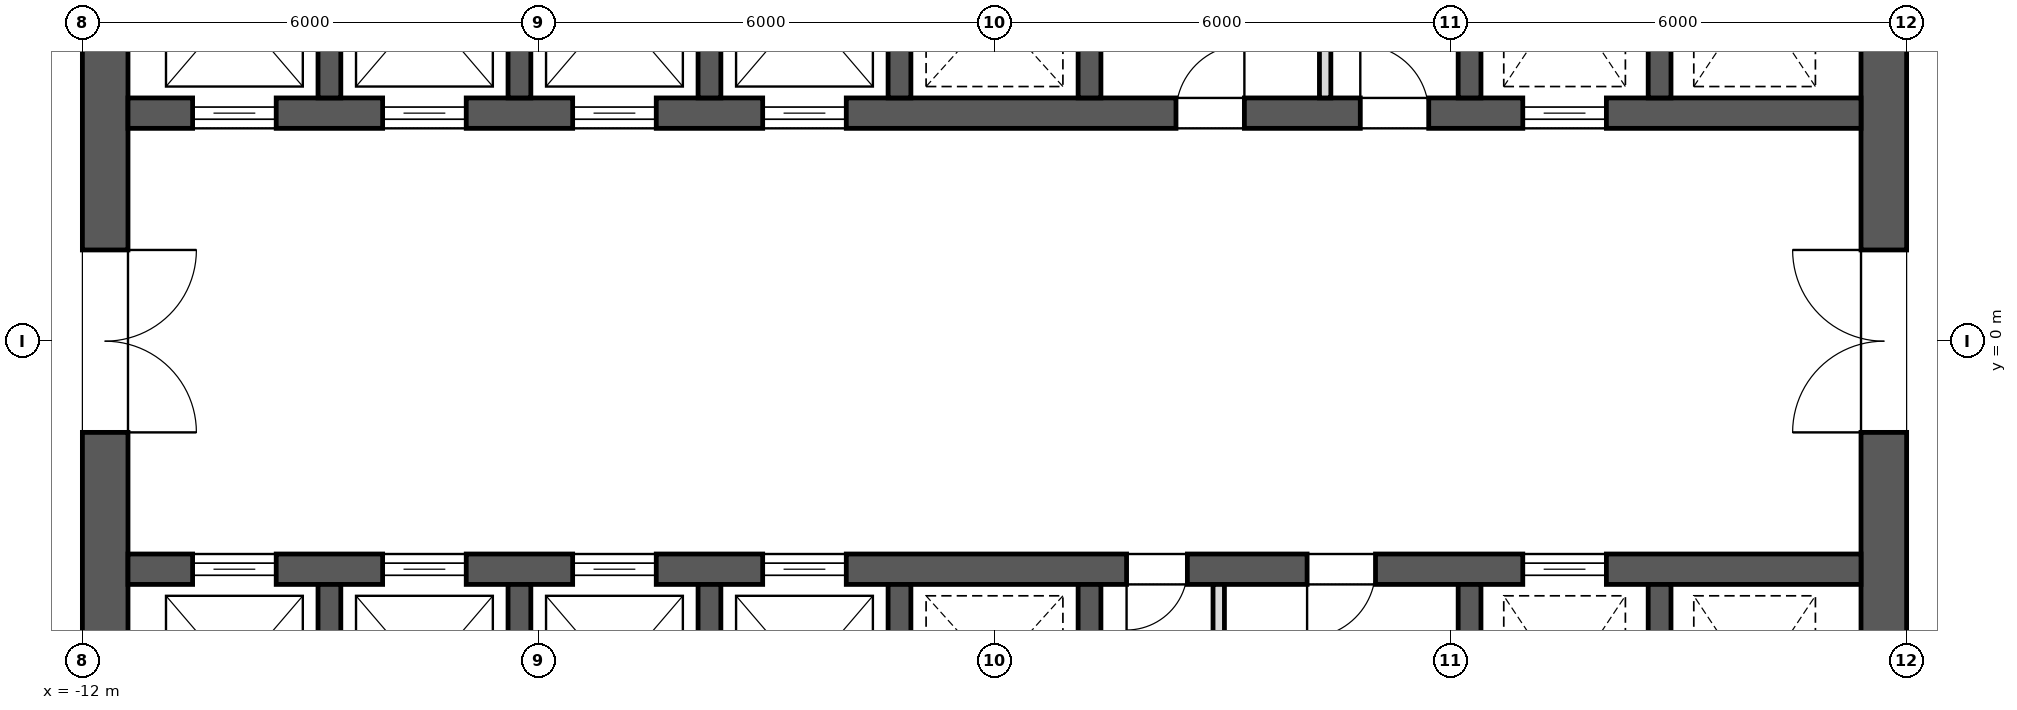
"""IFC4 building model, lengths in metres.
Left out: names, types, materials, properties, quantities, classifications, styles, units other than length and angle.
Written with IfcOpenShell. Run it as: python <this file> out.ifc"""

import sys

from ifc_helpers import new_model, si_unit, direction, frame, frame_2d, origin, place, context, subcontext, project, spatial, rectangle, extrude, element, fill, save


model = new_model("IFC4")
c1 = context("Model", 3, precision=1e-05, world=origin(), true_north=direction((0.0, 1.0)))
c2 = subcontext(c1, "Body", "Model", "MODEL_VIEW")
j1 = project(units=[si_unit("LENGTHUNIT", "METRE"), si_unit("PLANEANGLEUNIT", "RADIAN")], contexts=[c1])
p1 = place(None, origin())
s1 = spatial("IfcSite", under=j1, at=p1, CompositionType="ELEMENT")
p2 = place(p1, origin())
s2 = spatial("IfcBuilding", under=s1, at=p2, CompositionType="ELEMENT")
p3 = place(p2, frame((0.0, 0.0, 198.9)))
s3 = spatial("IfcBuildingStorey", under=s2, at=p3, CompositionType="ELEMENT", Elevation=198.9)
p4 = place(p3, frame((11.7, -11.4, 0.0), z_axis=(0.0, 0.0, 1.0), x_axis=(0.0, 1.0, 0.0)))
e1 = element("IfcWall", 1, at=p4, inside=s3, PredefinedType="SHEAR", context=c2, shape_type="SweptSolid", body=[
    extrude(rectangle(XDim=22.8, YDim=0.6, at=frame_2d((11.4, 0.0))), origin(), (0.0, 0.0, 1.0), 4.0),
])
p5 = place(p4, frame((10.2, 0.0, 0.0)))
e2 = element("IfcOpeningElement", 2, at=p5, cuts=e1, PredefinedType="OPENING", context=c2, shape_type="SweptSolid", body=[
    extrude(rectangle(XDim=2.4, YDim=2.1, at=frame_2d((1.2, 1.05))), frame((0.0, 0.312, 0.0), z_axis=(0.0, -1.0, 0.0), x_axis=(1.0, 0.0, 0.0)), (0.0, 0.0, 1.0), 0.624),
])
p6 = place(p4, frame((19.5, 0.0, 0.0)))
e3 = element("IfcOpeningElement", 3, at=p6, cuts=e1, PredefinedType="OPENING", context=c2, shape_type="SweptSolid", body=[
    extrude(rectangle(XDim=1.2, YDim=2.1, at=frame_2d((0.6, 1.05))), frame((0.0, 0.312, 0.0), z_axis=(0.0, -1.0, 0.0), x_axis=(1.0, 0.0, 0.0)), (0.0, 0.0, 1.0), 0.624),
])
p7 = place(p4, frame((2.1, 0.0, 0.0)))
e4 = element("IfcOpeningElement", 4, at=p7, cuts=e1, PredefinedType="OPENING", context=c2, shape_type="SweptSolid", body=[
    extrude(rectangle(XDim=1.2, YDim=2.1, at=frame_2d((0.6, 1.05))), frame((0.0, 0.312, 0.0), z_axis=(0.0, -1.0, 0.0), x_axis=(1.0, 0.0, 0.0)), (0.0, 0.0, 1.0), 0.624),
])
p8 = place(p3, frame((-11.7, -11.4, 0.0), z_axis=(0.0, 0.0, 1.0), x_axis=(0.0, 1.0, 0.0)))
e5 = element("IfcWall", 5, at=p8, inside=s3, PredefinedType="SHEAR", context=c2, shape_type="SweptSolid", body=[
    extrude(rectangle(XDim=22.8, YDim=0.6, at=frame_2d((11.4, 0.0))), origin(), (0.0, 0.0, 1.0), 4.0),
])
p9 = place(p8, frame((10.2, 0.0, 0.0)))
e6 = element("IfcOpeningElement", 6, at=p9, cuts=e5, PredefinedType="OPENING", context=c2, shape_type="SweptSolid", body=[
    extrude(rectangle(XDim=2.4, YDim=2.1, at=frame_2d((1.2, 1.05))), frame((0.0, 0.312, 0.0), z_axis=(0.0, -1.0, 0.0), x_axis=(1.0, 0.0, 0.0)), (0.0, 0.0, 1.0), 0.624),
])
p10 = place(p8, frame((18.925, 0.0, 0.0)))
e7 = element("IfcOpeningElement", 7, at=p10, cuts=e5, PredefinedType="OPENING", context=c2, shape_type="SweptSolid", body=[
    extrude(rectangle(XDim=1.2, YDim=2.1, at=frame_2d((0.6, 1.05))), frame((0.0, 0.312, 0.0), z_axis=(0.0, -1.0, 0.0), x_axis=(1.0, 0.0, 0.0)), (0.0, 0.0, 1.0), 0.624),
])
p11 = place(p8, frame((2.675, 0.0, 0.0)))
e8 = element("IfcOpeningElement", 8, at=p11, cuts=e5, PredefinedType="OPENING", context=c2, shape_type="SweptSolid", body=[
    extrude(rectangle(XDim=1.2, YDim=2.1, at=frame_2d((0.6, 1.05))), frame((0.0, 0.312, 0.0), z_axis=(0.0, -1.0, 0.0), x_axis=(1.0, 0.0, 0.0)), (0.0, 0.0, 1.0), 0.624),
])
p12 = place(p3, frame((-11.4, 3.0, 0.0), z_axis=(0.0, 0.0, 1.0), x_axis=(1.0, 0.0, 0.0)))
e9 = element("IfcWall", 9, at=p12, inside=s3, PredefinedType="SHEAR", context=c2, shape_type="SweptSolid", body=[
    extrude(rectangle(XDim=22.8, YDim=0.4, at=frame_2d((11.4, 0.0))), origin(), (0.0, 0.0, 1.0), 4.0),
])
p13 = place(p12, frame((0.85, 0.0, 0.0)))
e10 = element("IfcOpeningElement", 10, at=p13, cuts=e9, PredefinedType="OPENING", context=c2, shape_type="SweptSolid", body=[
    extrude(rectangle(XDim=1.1, YDim=2.1, at=frame_2d((0.55, 1.05))), frame((0.0, 0.212, 0.0), z_axis=(0.0, -1.0, 0.0), x_axis=(1.0, 0.0, 0.0)), (0.0, 0.0, 1.0), 0.424),
])
p14 = place(p12, frame((3.35, 0.0, 0.0)))
e11 = element("IfcOpeningElement", 11, at=p14, cuts=e9, PredefinedType="OPENING", context=c2, shape_type="SweptSolid", body=[
    extrude(rectangle(XDim=1.1, YDim=2.1, at=frame_2d((0.55, 1.05))), frame((0.0, 0.212, 0.0), z_axis=(0.0, -1.0, 0.0), x_axis=(1.0, 0.0, 0.0)), (0.0, 0.0, 1.0), 0.424),
])
p15 = place(p12, frame((5.85, 0.0, 0.0)))
e12 = element("IfcOpeningElement", 12, at=p15, cuts=e9, PredefinedType="OPENING", context=c2, shape_type="SweptSolid", body=[
    extrude(rectangle(XDim=1.1, YDim=2.1, at=frame_2d((0.55, 1.05))), frame((0.0, 0.212, 0.0), z_axis=(0.0, -1.0, 0.0), x_axis=(1.0, 0.0, 0.0)), (0.0, 0.0, 1.0), 0.424),
])
p16 = place(p12, frame((8.35, 0.0, 0.0)))
e13 = element("IfcOpeningElement", 13, at=p16, cuts=e9, PredefinedType="OPENING", context=c2, shape_type="SweptSolid", body=[
    extrude(rectangle(XDim=1.1, YDim=2.1, at=frame_2d((0.55, 1.05))), frame((0.0, 0.212, 0.0), z_axis=(0.0, -1.0, 0.0), x_axis=(1.0, 0.0, 0.0)), (0.0, 0.0, 1.0), 0.424),
])
p17 = place(p12, frame((18.35, 0.0, 0.0)))
e14 = element("IfcOpeningElement", 14, at=p17, cuts=e9, PredefinedType="OPENING", context=c2, shape_type="SweptSolid", body=[
    extrude(rectangle(XDim=1.1, YDim=2.1, at=frame_2d((0.55, 1.05))), frame((0.0, 0.212, 0.0), z_axis=(0.0, -1.0, 0.0), x_axis=(1.0, 0.0, 0.0)), (0.0, 0.0, 1.0), 0.424),
])
p18 = place(p12, frame((13.788, 0.0, 0.0)))
e15 = element("IfcOpeningElement", 15, at=p18, cuts=e9, PredefinedType="OPENING", context=c2, shape_type="SweptSolid", body=[
    extrude(rectangle(XDim=0.9, YDim=2.1, at=frame_2d((0.45, 1.05))), frame((0.0, 0.212, 0.0), z_axis=(0.0, -1.0, 0.0), x_axis=(1.0, 0.0, 0.0)), (0.0, 0.0, 1.0), 0.424),
])
p19 = place(p12, frame((16.212, 0.0, 0.0)))
e16 = element("IfcOpeningElement", 16, at=p19, cuts=e9, PredefinedType="OPENING", context=c2, shape_type="SweptSolid", body=[
    extrude(rectangle(XDim=0.9, YDim=2.1, at=frame_2d((0.45, 1.05))), frame((0.0, 0.212, 0.0), z_axis=(0.0, -1.0, 0.0), x_axis=(1.0, 0.0, 0.0)), (0.0, 0.0, 1.0), 0.424),
])
for number, where, z_axis, x_axis in (
    (17, (-8.75, 3.2, 0.0), (0.0, 0.0, 1.0), (0.0, 1.0, 0.0)),
    (18, (-6.25, 3.2, 0.0), (0.0, 0.0, 1.0), (0.0, 1.0, 0.0)),
    (19, (-3.75, 3.2, 0.0), (0.0, 0.0, 1.0), (0.0, 1.0, 0.0)),
    (20, (-1.25, 3.2, 0.0), (0.0, 0.0, 1.0), (0.0, 1.0, 0.0)),
    (21, (1.25, 3.2, 0.0), (0.0, 0.0, 1.0), (0.0, 1.0, 0.0)),
    (22, (6.25, 3.2, 0.0), (0.0, 0.0, 1.0), (0.0, 1.0, 0.0)),
    (23, (8.75, 3.2, 0.0), (0.0, 0.0, 1.0), (0.0, 1.0, 0.0)),
):
    element("IfcWall", number, at=place(p3, frame(where, z_axis=z_axis, x_axis=x_axis)), inside=s3, PredefinedType="SHEAR", context=c2, shape_type="SweptSolid", body=[
        extrude(rectangle(XDim=2.9, YDim=0.3, at=frame_2d((1.45, 0.0))), origin(), (0.0, 0.0, 1.0), 4.0),
    ])
p20 = place(p3, frame((-11.4, -3.0, 0.0), z_axis=(0.0, 0.0, 1.0), x_axis=(1.0, 0.0, 0.0)))
e24 = element("IfcWall", 24, at=p20, inside=s3, PredefinedType="SHEAR", context=c2, shape_type="SweptSolid", body=[
    extrude(rectangle(XDim=22.8, YDim=0.4, at=frame_2d((11.4, 0.0))), origin(), (0.0, 0.0, 1.0), 4.0),
])
p21 = place(p20, frame((0.85, 0.0, 0.0)))
e25 = element("IfcOpeningElement", 25, at=p21, cuts=e24, PredefinedType="OPENING", context=c2, shape_type="SweptSolid", body=[
    extrude(rectangle(XDim=1.1, YDim=2.1, at=frame_2d((0.55, 1.05))), frame((0.0, 0.212, 0.0), z_axis=(0.0, -1.0, 0.0), x_axis=(1.0, 0.0, 0.0)), (0.0, 0.0, 1.0), 0.424),
])
p22 = place(p20, frame((3.35, 0.0, 0.0)))
e26 = element("IfcOpeningElement", 26, at=p22, cuts=e24, PredefinedType="OPENING", context=c2, shape_type="SweptSolid", body=[
    extrude(rectangle(XDim=1.1, YDim=2.1, at=frame_2d((0.55, 1.05))), frame((0.0, 0.212, 0.0), z_axis=(0.0, -1.0, 0.0), x_axis=(1.0, 0.0, 0.0)), (0.0, 0.0, 1.0), 0.424),
])
p23 = place(p20, frame((5.85, 0.0, 0.0)))
e27 = element("IfcOpeningElement", 27, at=p23, cuts=e24, PredefinedType="OPENING", context=c2, shape_type="SweptSolid", body=[
    extrude(rectangle(XDim=1.1, YDim=2.1, at=frame_2d((0.55, 1.05))), frame((0.0, 0.212, 0.0), z_axis=(0.0, -1.0, 0.0), x_axis=(1.0, 0.0, 0.0)), (0.0, 0.0, 1.0), 0.424),
])
p24 = place(p20, frame((8.35, 0.0, 0.0)))
e28 = element("IfcOpeningElement", 28, at=p24, cuts=e24, PredefinedType="OPENING", context=c2, shape_type="SweptSolid", body=[
    extrude(rectangle(XDim=1.1, YDim=2.1, at=frame_2d((0.55, 1.05))), frame((0.0, 0.212, 0.0), z_axis=(0.0, -1.0, 0.0), x_axis=(1.0, 0.0, 0.0)), (0.0, 0.0, 1.0), 0.424),
])
p25 = place(p20, frame((18.35, 0.0, 0.0)))
e29 = element("IfcOpeningElement", 29, at=p25, cuts=e24, PredefinedType="OPENING", context=c2, shape_type="SweptSolid", body=[
    extrude(rectangle(XDim=1.1, YDim=2.1, at=frame_2d((0.55, 1.05))), frame((0.0, 0.212, 0.0), z_axis=(0.0, -1.0, 0.0), x_axis=(1.0, 0.0, 0.0)), (0.0, 0.0, 1.0), 0.424),
])
p26 = place(p20, frame((13.137, 0.0, 0.0)))
e30 = element("IfcOpeningElement", 30, at=p26, cuts=e24, PredefinedType="OPENING", context=c2, shape_type="SweptSolid", body=[
    extrude(rectangle(XDim=0.8, YDim=2.1, at=frame_2d((0.4, 1.05))), frame((0.0, 0.212, 0.0), z_axis=(0.0, -1.0, 0.0), x_axis=(1.0, 0.0, 0.0)), (0.0, 0.0, 1.0), 0.424),
])
p27 = place(p20, frame((15.512, 0.0, 0.0)))
e31 = element("IfcOpeningElement", 31, at=p27, cuts=e24, PredefinedType="OPENING", context=c2, shape_type="SweptSolid", body=[
    extrude(rectangle(XDim=0.9, YDim=2.1, at=frame_2d((0.45, 1.05))), frame((0.0, 0.212, 0.0), z_axis=(0.0, -1.0, 0.0), x_axis=(1.0, 0.0, 0.0)), (0.0, 0.0, 1.0), 0.424),
])
for number, where, z_axis, x_axis in (
    (32, (-8.75, -6.1, 0.0), (0.0, 0.0, 1.0), (0.0, 1.0, 0.0)),
    (33, (-6.25, -6.1, 0.0), (0.0, 0.0, 1.0), (0.0, 1.0, 0.0)),
    (34, (-3.75, -6.1, 0.0), (0.0, 0.0, 1.0), (0.0, 1.0, 0.0)),
    (35, (-1.25, -6.1, 0.0), (0.0, 0.0, 1.0), (0.0, 1.0, 0.0)),
    (36, (1.25, -6.1, 0.0), (0.0, 0.0, 1.0), (0.0, 1.0, 0.0)),
    (37, (6.25, -6.1, 0.0), (0.0, 0.0, 1.0), (0.0, 1.0, 0.0)),
    (38, (8.75, -6.1, 0.0), (0.0, 0.0, 1.0), (0.0, 1.0, 0.0)),
):
    element("IfcWall", number, at=place(p3, frame(where, z_axis=z_axis, x_axis=x_axis)), inside=s3, PredefinedType="SHEAR", context=c2, shape_type="SweptSolid", body=[
        extrude(rectangle(XDim=2.9, YDim=0.3, at=frame_2d((1.45, 0.0))), origin(), (0.0, 0.0, 1.0), 4.0),
    ])
for number, where, z_axis, x_axis in (
    (39, (4.35, 3.2, 0.0), (0.0, 0.0, 1.0), (0.0, 1.0, 0.0)),
    (40, (2.95, -6.1, 0.0), (0.0, 0.0, 1.0), (0.0, 1.0, 0.0)),
):
    element("IfcWall", number, at=place(p3, frame(where, z_axis=z_axis, x_axis=x_axis)), inside=s3, PredefinedType="PARTITIONING", context=c2, shape_type="SweptSolid", body=[
        extrude(rectangle(XDim=2.9, YDim=0.15, at=frame_2d((1.45, 0.0))), origin(), (0.0, 0.0, 1.0), 3.7),
    ])
p28 = place(p13, origin())
e41 = element("IfcDoor", 41, at=p28, inside=s3, OperationType="SLIDING_TO_LEFT", PredefinedType="DOOR", context=c2, shape_type="SweptSolid", body=[
    extrude(rectangle(XDim=1.1, YDim=2.1, at=frame_2d((0.55, 1.05))), frame((0.0, 0.025, 0.0), z_axis=(0.0, -1.0, 0.0), x_axis=(1.0, 0.0, 0.0)), (0.0, 0.0, 1.0), 0.05),
])
fill(e10, e41)
p29 = place(p14, origin())
e42 = element("IfcDoor", 42, at=p29, inside=s3, OperationType="SLIDING_TO_LEFT", PredefinedType="DOOR", context=c2, shape_type="SweptSolid", body=[
    extrude(rectangle(XDim=1.1, YDim=2.1, at=frame_2d((0.55, 1.05))), frame((0.0, 0.025, 0.0), z_axis=(0.0, -1.0, 0.0), x_axis=(1.0, 0.0, 0.0)), (0.0, 0.0, 1.0), 0.05),
])
fill(e11, e42)
p30 = place(p21, origin())
e43 = element("IfcDoor", 43, at=p30, inside=s3, OperationType="SLIDING_TO_LEFT", PredefinedType="DOOR", context=c2, shape_type="SweptSolid", body=[
    extrude(rectangle(XDim=1.1, YDim=2.1, at=frame_2d((0.55, 1.05))), frame((0.0, 0.025, 0.0), z_axis=(0.0, -1.0, 0.0), x_axis=(1.0, 0.0, 0.0)), (0.0, 0.0, 1.0), 0.05),
])
fill(e25, e43)
p31 = place(p22, origin())
e44 = element("IfcDoor", 44, at=p31, inside=s3, OperationType="SLIDING_TO_LEFT", PredefinedType="DOOR", context=c2, shape_type="SweptSolid", body=[
    extrude(rectangle(XDim=1.1, YDim=2.1, at=frame_2d((0.55, 1.05))), frame((0.0, 0.025, 0.0), z_axis=(0.0, -1.0, 0.0), x_axis=(1.0, 0.0, 0.0)), (0.0, 0.0, 1.0), 0.05),
])
fill(e26, e44)
p32 = place(p15, origin())
e45 = element("IfcDoor", 45, at=p32, inside=s3, OperationType="SLIDING_TO_LEFT", PredefinedType="DOOR", context=c2, shape_type="SweptSolid", body=[
    extrude(rectangle(XDim=1.1, YDim=2.1, at=frame_2d((0.55, 1.05))), frame((0.0, 0.025, 0.0), z_axis=(0.0, -1.0, 0.0), x_axis=(1.0, 0.0, 0.0)), (0.0, 0.0, 1.0), 0.05),
])
fill(e12, e45)
p33 = place(p16, origin())
e46 = element("IfcDoor", 46, at=p33, inside=s3, OperationType="SLIDING_TO_LEFT", PredefinedType="DOOR", context=c2, shape_type="SweptSolid", body=[
    extrude(rectangle(XDim=1.1, YDim=2.1, at=frame_2d((0.55, 1.05))), frame((0.0, 0.025, 0.0), z_axis=(0.0, -1.0, 0.0), x_axis=(1.0, 0.0, 0.0)), (0.0, 0.0, 1.0), 0.05),
])
fill(e13, e46)
p34 = place(p23, origin())
e47 = element("IfcDoor", 47, at=p34, inside=s3, OperationType="SLIDING_TO_LEFT", PredefinedType="DOOR", context=c2, shape_type="SweptSolid", body=[
    extrude(rectangle(XDim=1.1, YDim=2.1, at=frame_2d((0.55, 1.05))), frame((0.0, 0.025, 0.0), z_axis=(0.0, -1.0, 0.0), x_axis=(1.0, 0.0, 0.0)), (0.0, 0.0, 1.0), 0.05),
])
fill(e27, e47)
p35 = place(p24, origin())
e48 = element("IfcDoor", 48, at=p35, inside=s3, OperationType="SLIDING_TO_LEFT", PredefinedType="DOOR", context=c2, shape_type="SweptSolid", body=[
    extrude(rectangle(XDim=1.1, YDim=2.1, at=frame_2d((0.55, 1.05))), frame((0.0, 0.025, 0.0), z_axis=(0.0, -1.0, 0.0), x_axis=(1.0, 0.0, 0.0)), (0.0, 0.0, 1.0), 0.05),
])
fill(e28, e48)
p36 = place(p17, origin())
e49 = element("IfcDoor", 49, at=p36, inside=s3, OperationType="SLIDING_TO_LEFT", PredefinedType="DOOR", context=c2, shape_type="SweptSolid", body=[
    extrude(rectangle(XDim=1.1, YDim=2.1, at=frame_2d((0.55, 1.05))), frame((0.0, 0.025, 0.0), z_axis=(0.0, -1.0, 0.0), x_axis=(1.0, 0.0, 0.0)), (0.0, 0.0, 1.0), 0.05),
])
fill(e14, e49)
p37 = place(p25, origin())
e50 = element("IfcDoor", 50, at=p37, inside=s3, OperationType="SLIDING_TO_LEFT", PredefinedType="DOOR", context=c2, shape_type="SweptSolid", body=[
    extrude(rectangle(XDim=1.1, YDim=2.1, at=frame_2d((0.55, 1.05))), frame((0.0, 0.025, 0.0), z_axis=(0.0, -1.0, 0.0), x_axis=(1.0, 0.0, 0.0)), (0.0, 0.0, 1.0), 0.05),
])
fill(e29, e50)
p38 = place(p9, frame((2.4, 0.0, 0.0), z_axis=(0.0, 0.0, 1.0), x_axis=(-1.0, 0.0, 0.0)))
e51 = element("IfcDoor", 51, at=p38, inside=s3, OperationType="DOUBLE_DOOR_SINGLE_SWING", PredefinedType="DOOR", context=c2, shape_type="SweptSolid", body=[
    extrude(rectangle(XDim=2.4, YDim=2.1, at=frame_2d((1.2, 1.05))), frame((0.0, 0.025, 0.0), z_axis=(0.0, -1.0, 0.0), x_axis=(1.0, 0.0, 0.0)), (0.0, 0.0, 1.0), 0.05),
])
fill(e6, e51)
p39 = place(p5, origin())
e52 = element("IfcDoor", 52, at=p39, inside=s3, OperationType="DOUBLE_DOOR_SINGLE_SWING", PredefinedType="DOOR", context=c2, shape_type="SweptSolid", body=[
    extrude(rectangle(XDim=2.4, YDim=2.1, at=frame_2d((1.2, 1.05))), frame((0.0, 0.025, 0.0), z_axis=(0.0, -1.0, 0.0), x_axis=(1.0, 0.0, 0.0)), (0.0, 0.0, 1.0), 0.05),
])
fill(e2, e52)
p40 = place(p18, origin())
e53 = element("IfcDoor", 53, at=p40, inside=s3, OperationType="SINGLE_SWING_LEFT", PredefinedType="DOOR", context=c2, shape_type="SweptSolid", body=[
    extrude(rectangle(XDim=0.9, YDim=2.1, at=frame_2d((0.45, 1.05))), frame((0.0, 0.025, 0.0), z_axis=(0.0, -1.0, 0.0), x_axis=(1.0, 0.0, 0.0)), (0.0, 0.0, 1.0), 0.05),
])
fill(e15, e53)
p41 = place(p19, origin())
e54 = element("IfcDoor", 54, at=p41, inside=s3, OperationType="SINGLE_SWING_RIGHT", PredefinedType="DOOR", context=c2, shape_type="SweptSolid", body=[
    extrude(rectangle(XDim=0.9, YDim=2.1, at=frame_2d((0.45, 1.05))), frame((0.0, 0.025, 0.0), z_axis=(0.0, -1.0, 0.0), x_axis=(1.0, 0.0, 0.0)), (0.0, 0.0, 1.0), 0.05),
])
fill(e16, e54)
p42 = place(p26, frame((0.8, 0.0, 0.0), z_axis=(0.0, 0.0, 1.0), x_axis=(-1.0, 0.0, 0.0)))
e55 = element("IfcDoor", 55, at=p42, inside=s3, OperationType="SINGLE_SWING_LEFT", PredefinedType="DOOR", context=c2, shape_type="SweptSolid", body=[
    extrude(rectangle(XDim=0.8, YDim=2.1, at=frame_2d((0.4, 1.05))), frame((0.0, 0.025, 0.0), z_axis=(0.0, -1.0, 0.0), x_axis=(1.0, 0.0, 0.0)), (0.0, 0.0, 1.0), 0.05),
])
fill(e30, e55)
p43 = place(p27, frame((0.9, 0.0, 0.0), z_axis=(0.0, 0.0, 1.0), x_axis=(-1.0, 0.0, 0.0)))
e56 = element("IfcDoor", 56, at=p43, inside=s3, OperationType="SINGLE_SWING_LEFT", PredefinedType="DOOR", context=c2, shape_type="SweptSolid", body=[
    extrude(rectangle(XDim=0.9, YDim=2.1, at=frame_2d((0.45, 1.05))), frame((0.0, 0.025, 0.0), z_axis=(0.0, -1.0, 0.0), x_axis=(1.0, 0.0, 0.0)), (0.0, 0.0, 1.0), 0.05),
])
fill(e31, e56)
save(model, sys.argv[1])
